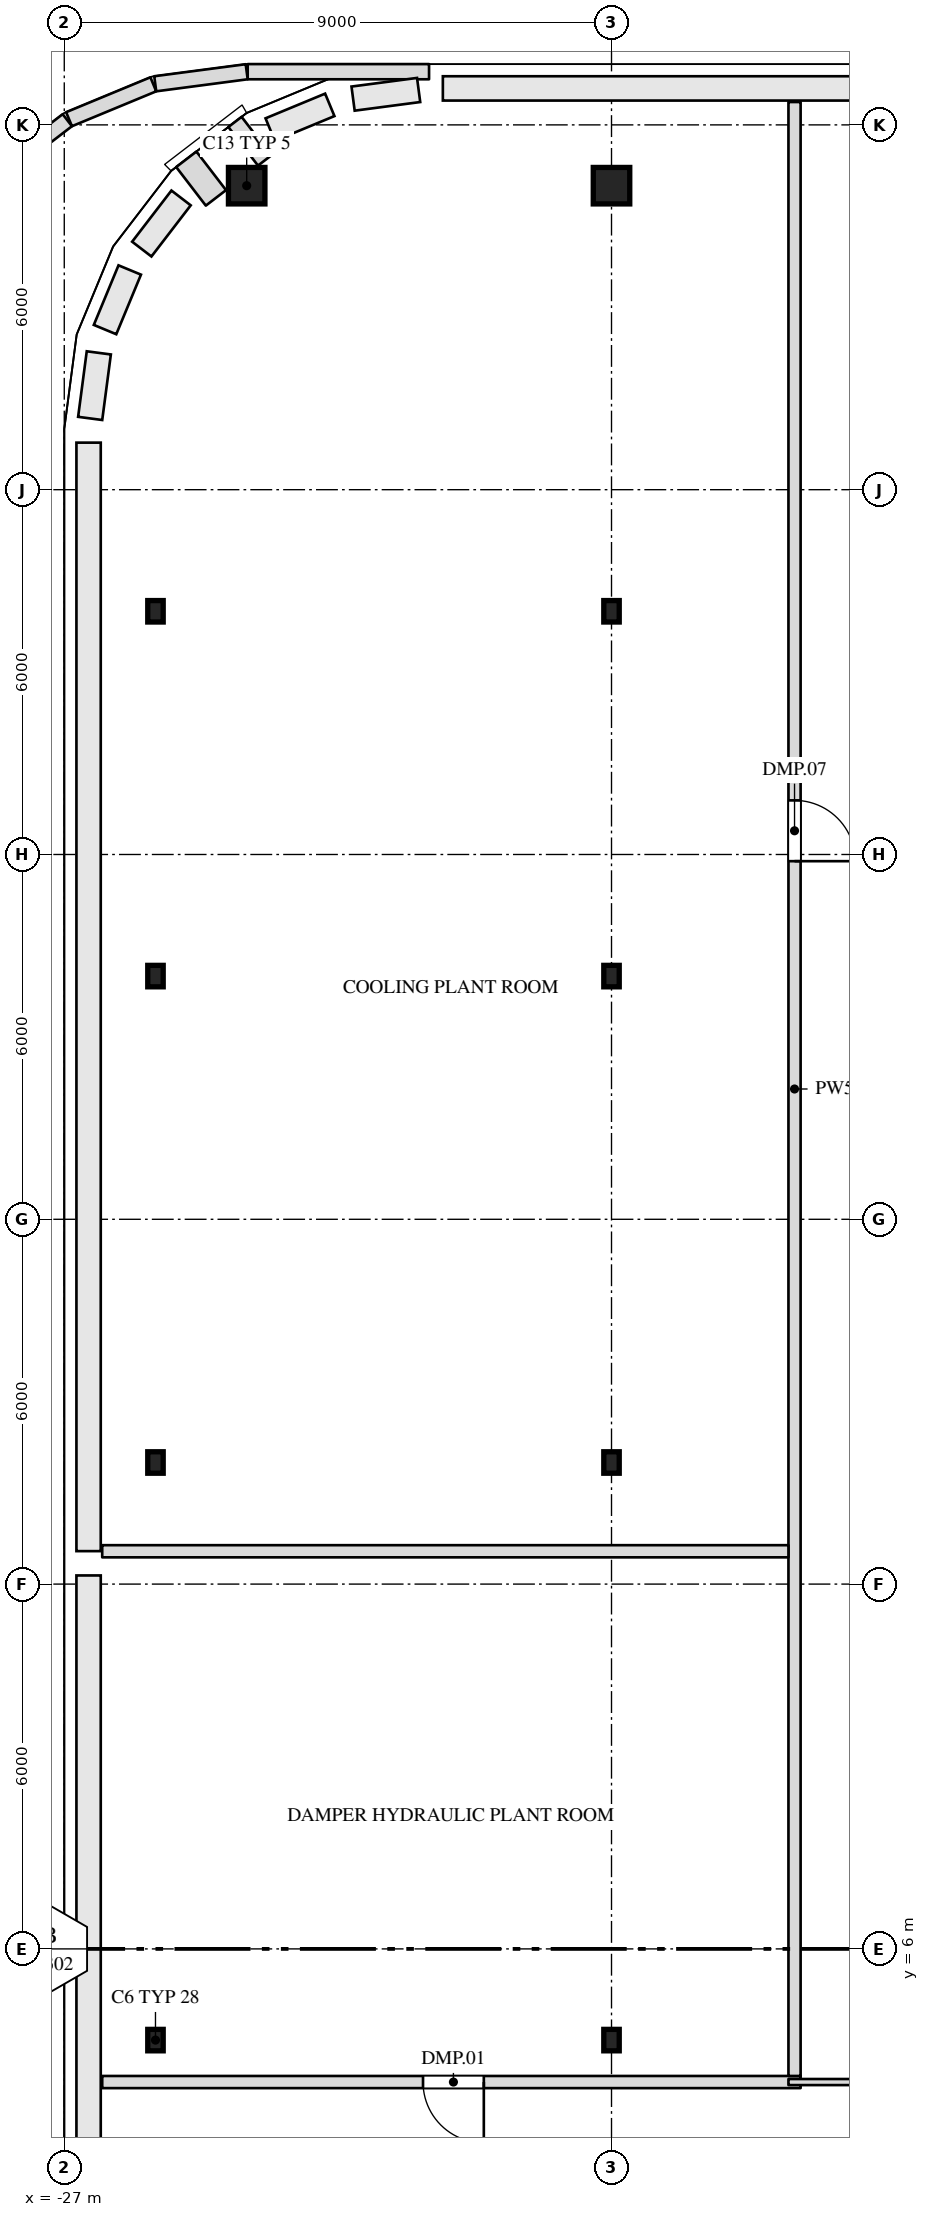
"""IFC4 building model, lengths in metres.
Left out: names, types, materials, properties, quantities, classifications, styles, units other than length and angle.
Written with IfcOpenShell. Run it as: python <this file> out.ifc"""

import sys

from ifc_helpers import new_model, si_unit, direction, frame, frame_2d, origin, origin_2d, place, context, subcontext, project, spatial, rectangle, i_section, extrude, element, fill, save


model = new_model("IFC4")
c1 = context("Model", 3, precision=1e-05, world=origin(), true_north=direction((0.0, 1.0)))
c2 = subcontext(c1, "Body", "Model", "MODEL_VIEW")
j1 = project(units=[si_unit("LENGTHUNIT", "METRE"), si_unit("PLANEANGLEUNIT", "RADIAN")], contexts=[c1])
p1 = place(None, origin())
s1 = spatial("IfcSite", under=j1, at=p1, CompositionType="ELEMENT")
p2 = place(p1, origin())
s2 = spatial("IfcBuilding", under=s1, at=p2, CompositionType="ELEMENT")
p3 = place(p2, frame((0.0, 0.0, 296.5)))
s3 = spatial("IfcBuildingStorey", under=s2, at=p3, CompositionType="ELEMENT", Elevation=296.5)
for number, where, z_axis, x_axis in (
    (1, (-25.5, 4.5, 0.0), (0.0, 0.0, 1.0), (1.0, 0.0, 0.0)),
    (2, (-18.0, 4.5, 0.0), (0.0, 0.0, 1.0), (1.0, 0.0, 0.0)),
    (3, (-25.5, 14.0, 0.0), (0.0, 0.0, 1.0), (1.0, 0.0, 0.0)),
    (4, (-18.0, 14.0, 0.0), (0.0, 0.0, 1.0), (1.0, 0.0, 0.0)),
    (5, (-25.5, 22.0, 0.0), (0.0, 0.0, 1.0), (1.0, 0.0, 0.0)),
    (6, (-18.0, 22.0, 0.0), (0.0, 0.0, 1.0), (1.0, 0.0, 0.0)),
    (7, (-25.5, 28.0, 0.0), (0.0, 0.0, 1.0), (1.0, 0.0, 0.0)),
    (8, (-18.0, 28.0, 0.0), (0.0, 0.0, 1.0), (1.0, 0.0, 0.0)),
):
    element("IfcColumn", number, at=place(p3, frame(where, z_axis=z_axis, x_axis=x_axis)), inside=s3, PredefinedType="COLUMN", context=c2, shape_type="SweptSolid", body=[
        extrude(i_section(OverallWidth=0.254, OverallDepth=0.353, WebThickness=0.01, FlangeThickness=0.016, at=origin_2d()), origin(), (0.0, 0.0, 1.0), 9.0),
    ])
for number, where, z_axis, x_axis in (
    (9, (-24.0, 35.0, 0.0), (0.0, 0.0, 1.0), (1.0, 0.0, 0.0)),
    (10, (-18.0, 35.0, 0.0), (0.0, 0.0, 1.0), (1.0, 0.0, 0.0)),
):
    element("IfcColumn", number, at=place(p3, frame(where, z_axis=z_axis, x_axis=x_axis)), inside=s3, PredefinedType="COLUMN", context=c2, shape_type="SweptSolid", body=[
        extrude(rectangle(XDim=0.6, YDim=0.6, at=origin_2d()), origin(), (0.0, 0.0, 1.0), 9.0),
    ])
p4 = place(p3, frame((-26.376, 3.81, 0.0), z_axis=(0.0, 0.0, 1.0), x_axis=(1.0, 0.0, 0.0)))
e11 = element("IfcWall", 11, at=p4, inside=s3, PredefinedType="PARTITIONING", context=c2, shape_type="SweptSolid", body=[
    extrude(rectangle(XDim=11.486, YDim=0.2, at=frame_2d((5.743, 0.0))), origin(), (0.0, 0.0, 1.0), 8.65),
])
p5 = place(p4, frame((5.276, 0.0, 0.0)))
e12 = element("IfcOpeningElement", 12, at=p5, cuts=e11, PredefinedType="OPENING", context=c2, shape_type="SweptSolid", body=[
    extrude(rectangle(XDim=1.0, YDim=2.1, at=frame_2d((0.5, 1.05))), frame((0.0, 0.112, 0.0), z_axis=(0.0, -1.0, 0.0), x_axis=(1.0, 0.0, 0.0)), (0.0, 0.0, 1.0), 0.224),
])
p6 = place(p3, frame((-15.09, 3.81, 0.0), z_axis=(0.0, 0.0, 1.0), x_axis=(1.0, 0.0, 0.0)))
e13 = element("IfcWall", 13, at=p6, inside=s3, PredefinedType="PARTITIONING", context=c2, shape_type="SweptSolid", body=[
    extrude(rectangle(XDim=30.18, YDim=0.1, at=frame_2d((15.09, 0.0))), origin(), (0.0, 0.0, 1.0), 8.65),
])
p7 = place(p6, frame((3.65, 0.0, 0.0)))
e14 = element("IfcOpeningElement", 14, at=p7, cuts=e13, PredefinedType="OPENING", context=c2, shape_type="SweptSolid", body=[
    extrude(rectangle(XDim=2.0, YDim=2.4, at=frame_2d((1.0, 1.2))), frame((0.0, 0.062, 0.0), z_axis=(0.0, -1.0, 0.0), x_axis=(1.0, 0.0, 0.0)), (0.0, 0.0, 1.0), 0.124),
])
p8 = place(p6, frame((21.65, 0.0, 0.0)))
e15 = element("IfcOpeningElement", 15, at=p8, cuts=e13, PredefinedType="OPENING", context=c2, shape_type="SweptSolid", body=[
    extrude(rectangle(XDim=2.0, YDim=2.4, at=frame_2d((1.0, 1.2))), frame((0.0, 0.062, 0.0), z_axis=(0.0, -1.0, 0.0), x_axis=(1.0, 0.0, 0.0)), (0.0, 0.0, 1.0), 0.124),
])
p9 = place(p3, frame((-14.99, 3.91, 0.0), z_axis=(0.0, 0.0, 1.0), x_axis=(0.0, 1.0, 0.0)))
e16 = element("IfcWall", 16, at=p9, inside=s3, PredefinedType="PARTITIONING", context=c2, shape_type="SweptSolid", body=[
    extrude(rectangle(XDim=32.466, YDim=0.2, at=frame_2d((16.233, 0.0))), origin(), (0.0, 0.0, 1.0), 8.65),
])
p10 = place(p9, frame((19.98, 0.0, 0.0)))
e17 = element("IfcOpeningElement", 17, at=p10, cuts=e16, PredefinedType="OPENING", context=c2, shape_type="SweptSolid", body=[
    extrude(rectangle(XDim=1.0, YDim=2.1, at=frame_2d((0.5, 1.05))), frame((0.0, 0.112, 0.0), z_axis=(0.0, -1.0, 0.0), x_axis=(1.0, 0.0, 0.0)), (0.0, 0.0, 1.0), 0.224),
])
p11 = place(p3, frame((-26.376, 12.54, 0.0), z_axis=(0.0, 0.0, 1.0), x_axis=(1.0, 0.0, 0.0)))
e18 = element("IfcWall", 18, at=p11, inside=s3, PredefinedType="PARTITIONING", context=c2, shape_type="SweptSolid", body=[
    extrude(rectangle(XDim=11.286, YDim=0.2, at=frame_2d((5.643, 0.0))), origin(), (0.0, 0.0, 1.0), 8.65),
])
p12 = place(p3, frame((-23.84, 35.815, 0.0), z_axis=(0.0, 0.0, 1.0), x_axis=(-0.793219322038, -0.608936045201, 0.0)))
e19 = element("IfcWall", 19, at=p12, inside=s3, PredefinedType="SOLIDWALL", context=c2, shape_type="SweptSolid", body=[
    extrude(rectangle(XDim=0.274, YDim=0.8, at=frame_2d((0.137, 0.0))), origin(), (0.0, 0.0, 1.0), 8.65),
])
p13 = place(p3, frame((-24.583, 35.244, 0.0), z_axis=(0.0, 0.0, 1.0), x_axis=(-0.793165294641, -0.609006416532, 0.0)))
e20 = element("IfcWall", 20, at=p13, inside=s3, PredefinedType="SOLIDWALL", context=c2, shape_type="SweptSolid", body=[
    extrude(rectangle(XDim=0.419, YDim=0.8, at=frame_2d((0.209, 0.0))), origin(), (0.0, 0.0, 1.0), 8.65),
])
p14 = place(p3, frame((-21.001, 36.875, 0.0), z_axis=(0.0, 0.0, 1.0), x_axis=(-1.0, 0.0, 0.0)))
e21 = element("IfcWall", 21, at=p14, inside=s3, PredefinedType="PARAPET", context=c2, shape_type="SweptSolid", body=[
    extrude(rectangle(XDim=2.983, YDim=0.25, at=frame_2d((1.491, 0.0))), origin(), (0.0, 0.0, 1.0), 1.1),
])
p15 = place(p3, frame((-24.0, 36.874, 0.0), z_axis=(0.0, 0.0, 1.0), x_axis=(-0.991465248625, -0.130371242108, 0.0)))
e22 = element("IfcWall", 22, at=p15, inside=s3, PredefinedType="PARAPET", context=c2, shape_type="SweptSolid", body=[
    extrude(rectangle(XDim=1.517, YDim=0.25, at=frame_2d((0.758, 0.0))), origin(), (0.0, 0.0, 1.0), 1.1),
])
for number, where, z_axis, x_axis in (
    (23, (-25.535, 36.667, 0.0), (0.0, 0.0, 1.0), (-0.924, -0.383, 0.0)),
    (24, (-26.95, 36.077, 0.0), (0.0, 0.0, 1.0), (-0.793, -0.609, 0.0)),
):
    element("IfcWall", number, at=place(p3, frame(where, z_axis=z_axis, x_axis=x_axis)), inside=s3, PredefinedType="PARAPET", context=c2, shape_type="SweptSolid", body=[
        extrude(rectangle(XDim=1.5, YDim=0.25, at=frame_2d((0.75, 0.0))), origin(), (0.0, 0.0, 1.0), 1.1),
    ])
p16 = place(p5, origin())
e25 = element("IfcDoor", 25, at=p16, inside=s3, OperationType="SINGLE_SWING_LEFT", PredefinedType="DOOR", context=c2, shape_type="SweptSolid", body=[
    extrude(rectangle(XDim=1.0, YDim=2.1, at=frame_2d((0.5, 1.05))), frame((0.0, 0.025, 0.0), z_axis=(0.0, -1.0, 0.0), x_axis=(1.0, 0.0, 0.0)), (0.0, 0.0, 1.0), 0.05),
])
fill(e12, e25)
p17 = place(p10, origin())
e26 = element("IfcDoor", 26, at=p17, inside=s3, OperationType="SINGLE_SWING_RIGHT", PredefinedType="DOOR", context=c2, shape_type="SweptSolid", body=[
    extrude(rectangle(XDim=1.0, YDim=2.1, at=frame_2d((0.5, 1.05))), frame((0.0, 0.025, 0.0), z_axis=(0.0, -1.0, 0.0), x_axis=(1.0, 0.0, 0.0)), (0.0, 0.0, 1.0), 0.05),
])
fill(e17, e26)
save(model, sys.argv[1])
